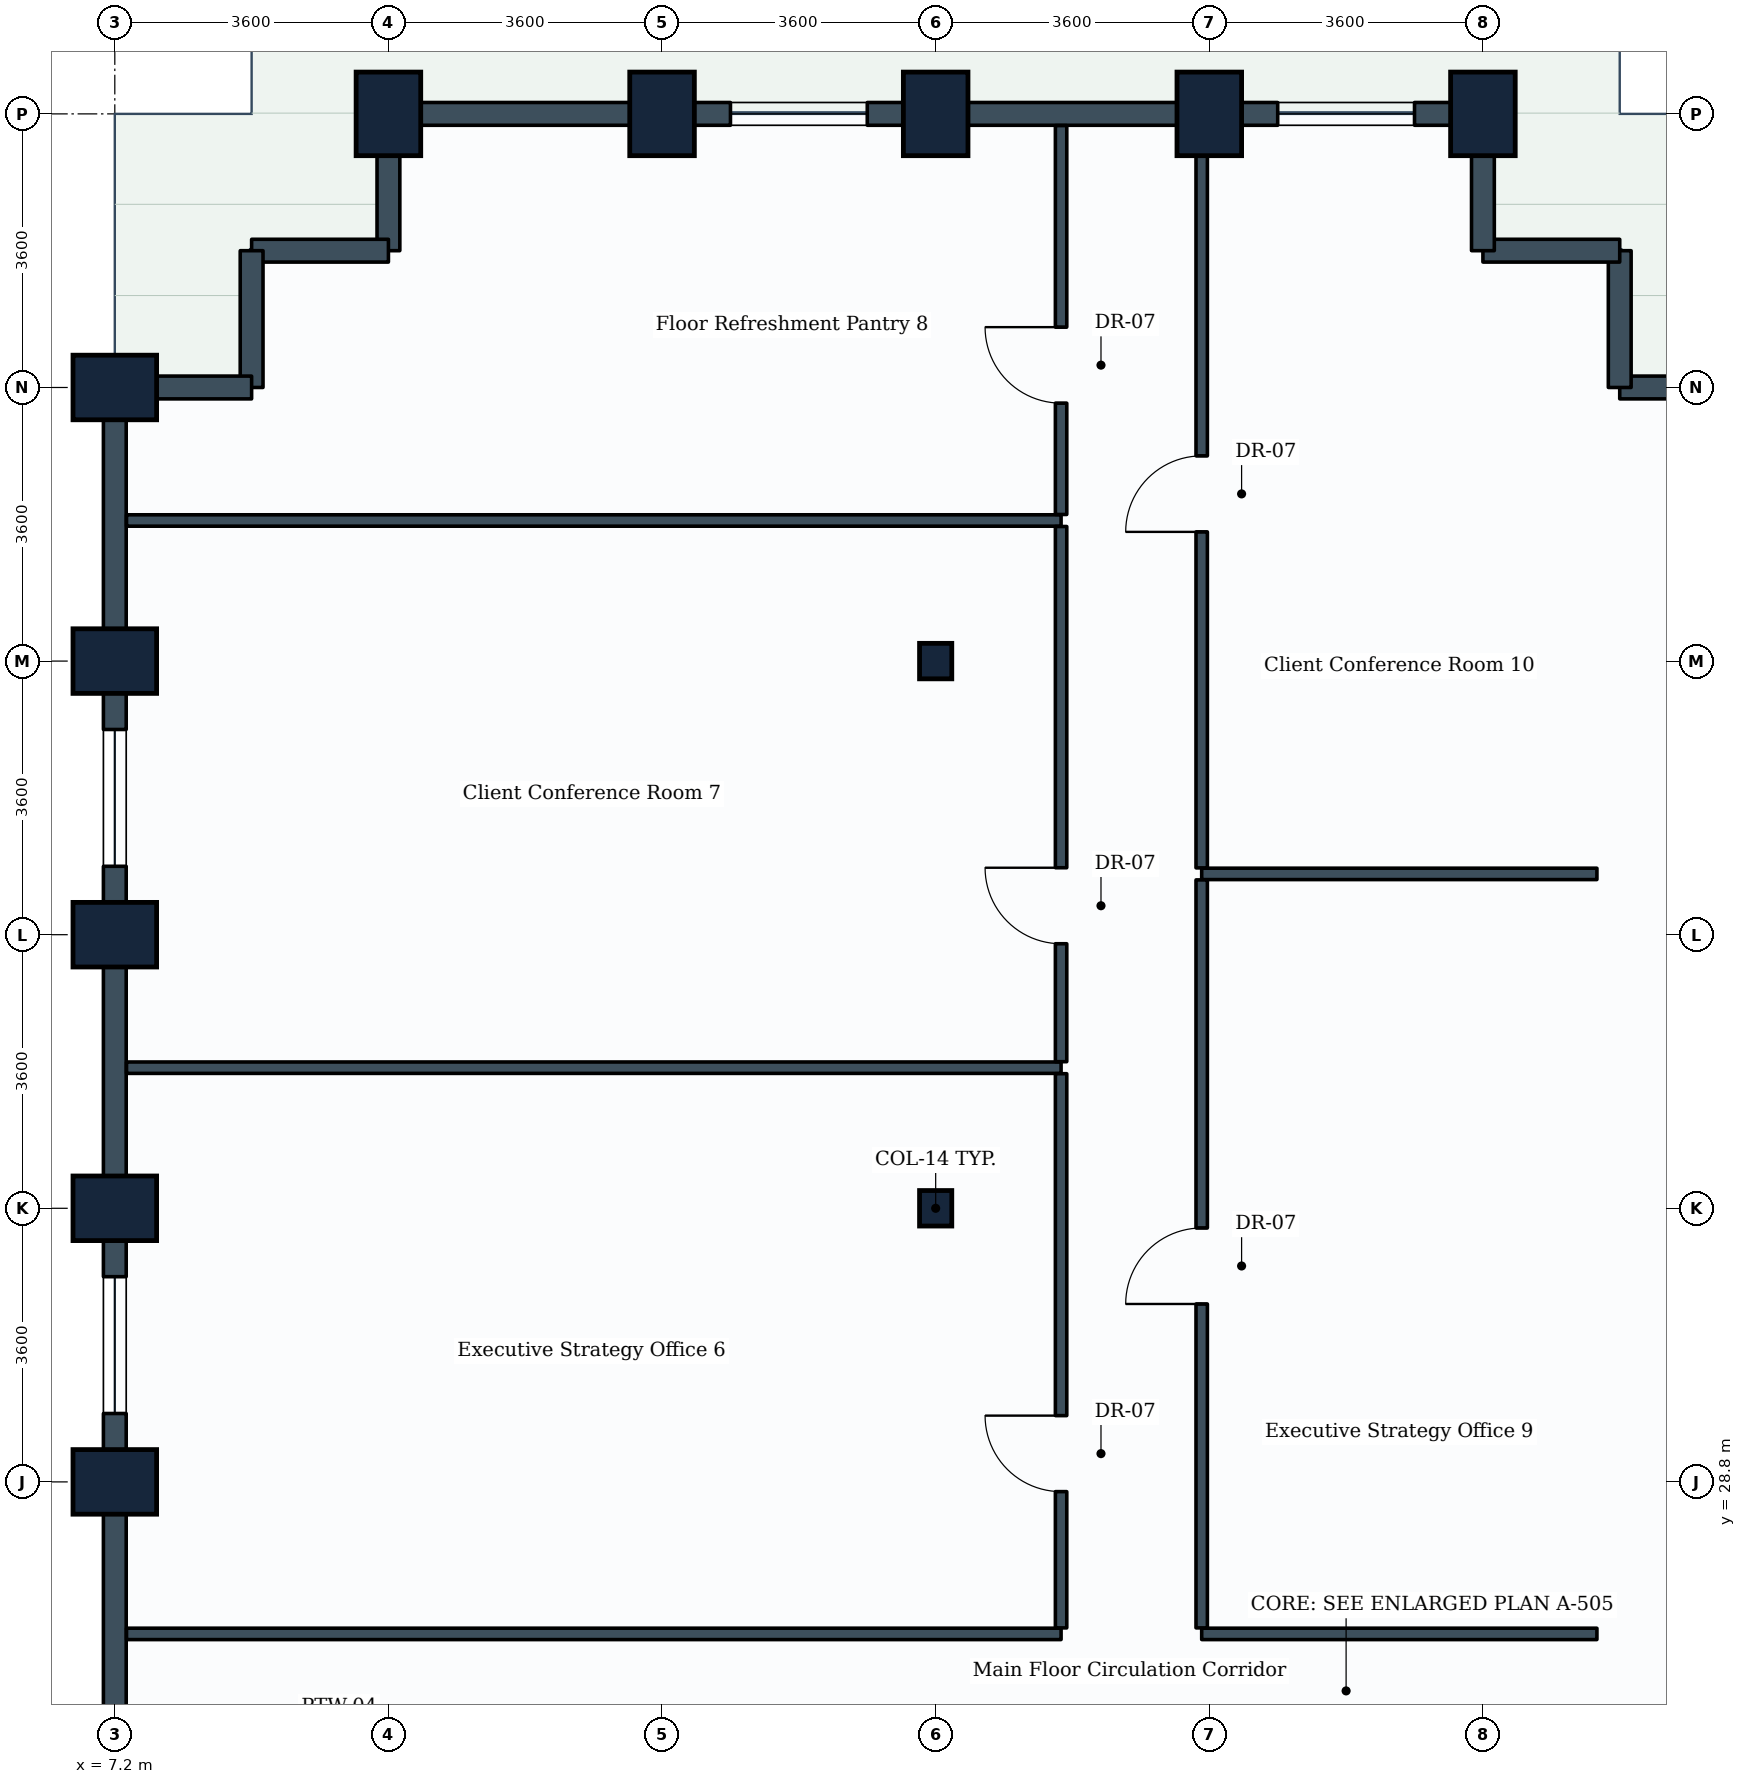
"""IFC4 building model, lengths in metres.
Left out: names, types, materials, properties, quantities, classifications, styles, units other than length and angle.
Written with IfcOpenShell. Run it as: python <this file> out.ifc"""

import sys

from ifc_helpers import new_model, si_unit, direction, frame, frame_2d, origin, origin_2d, place, context, subcontext, project, spatial, rectangle, i_section, extrude, element, fill, save


model = new_model("IFC4")
c1 = context("Model", 3, precision=1e-05, world=origin(), true_north=direction((0.0, 1.0)))
c2 = subcontext(c1, "Body", "Model", "MODEL_VIEW")
j1 = project(units=[si_unit("LENGTHUNIT", "METRE"), si_unit("PLANEANGLEUNIT", "RADIAN")], contexts=[c1])
p1 = place(None, origin())
s1 = spatial("IfcSite", under=j1, at=p1, CompositionType="ELEMENT")
p2 = place(p1, origin())
s2 = spatial("IfcBuilding", under=s1, at=p2, CompositionType="ELEMENT")
p3 = place(p2, frame((0.0, 0.0, 80.1)))
s3 = spatial("IfcBuildingStorey", under=s2, at=p3, CompositionType="ELEMENT", Elevation=80.1)
for number, where, z_axis, x_axis in (
    (1, (7.2, 28.8, 0.0), (0.0, 0.0, 1.0), (0.0, 1.0, 0.0)),
    (2, (7.2, 32.4, 0.0), (0.0, 0.0, 1.0), (0.0, 1.0, 0.0)),
    (3, (7.2, 36.0, 0.0), (0.0, 0.0, 1.0), (0.0, 1.0, 0.0)),
    (4, (7.2, 39.6, 0.0), (0.0, 0.0, 1.0), (0.0, 1.0, 0.0)),
    (5, (7.2, 43.2, 0.0), (0.0, 0.0, 1.0), (0.0, 1.0, 0.0)),
    (6, (10.8, 46.8, 0.0), (0.0, 0.0, 1.0), (1.0, 0.0, 0.0)),
    (7, (14.4, 46.8, 0.0), (0.0, 0.0, 1.0), (1.0, 0.0, 0.0)),
):
    element("IfcColumn", number, at=place(p3, frame(where, z_axis=z_axis, x_axis=x_axis)), inside=s3, PredefinedType="COLUMN", context=c2, shape_type="SweptSolid", body=[
        extrude(rectangle(XDim=0.85, YDim=1.1, at=origin_2d()), origin(), (0.0, 0.0, 1.0), 3.9),
    ])
for number, where, z_axis, x_axis in (
    (8, (18.0, 32.4, 0.0), (0.0, 0.0, 1.0), (1.0, 0.0, 0.0)),
    (9, (18.0, 39.6, 0.0), (0.0, 0.0, 1.0), (1.0, 0.0, 0.0)),
):
    element("IfcColumn", number, at=place(p3, frame(where, z_axis=z_axis, x_axis=x_axis)), inside=s3, PredefinedType="COLUMN", context=c2, shape_type="SweptSolid", body=[
        extrude(i_section(OverallWidth=0.424, OverallDepth=0.467, WebThickness=0.033, FlangeThickness=0.053, FilletRadius=0.015, at=origin_2d()), origin(), (0.0, 0.0, 1.0), 3.9),
    ])
for number, where, z_axis, x_axis in (
    (10, (18.0, 46.8, 0.0), (0.0, 0.0, 1.0), (1.0, 0.0, 0.0)),
    (11, (21.6, 46.8, 0.0), (0.0, 0.0, 1.0), (1.0, 0.0, 0.0)),
    (12, (25.2, 46.8, 0.0), (0.0, 0.0, 1.0), (1.0, 0.0, 0.0)),
):
    element("IfcColumn", number, at=place(p3, frame(where, z_axis=z_axis, x_axis=x_axis)), inside=s3, PredefinedType="COLUMN", context=c2, shape_type="SweptSolid", body=[
        extrude(rectangle(XDim=0.85, YDim=1.1, at=origin_2d()), origin(), (0.0, 0.0, 1.0), 3.9),
    ])
p4 = place(p3, frame((27.0, 43.2, 0.0), z_axis=(0.0, 0.0, 1.0), x_axis=(1.0, 0.0, 0.0)))
e13 = element("IfcWall", 13, at=p4, inside=s3, PredefinedType="STANDARD", context=c2, shape_type="SweptSolid", body=[
    extrude(rectangle(XDim=1.8, YDim=0.3, at=frame_2d((0.9, 0.0))), origin(), (0.0, 0.0, 1.0), 2.93),
])
for number, where, z_axis, x_axis in (
    (14, (27.0, 43.2, 0.0), (0.0, 0.0, 1.0), (0.0, 1.0, 0.0)),
    (15, (25.2, 45.0, 0.0), (0.0, 0.0, 1.0), (1.0, 0.0, 0.0)),
):
    element("IfcWall", number, at=place(p3, frame(where, z_axis=z_axis, x_axis=x_axis)), inside=s3, PredefinedType="STANDARD", context=c2, shape_type="SweptSolid", body=[
        extrude(rectangle(XDim=1.8, YDim=0.3, at=frame_2d((0.9, 0.0))), origin(), (0.0, 0.0, 1.0), 3.635),
    ])
p5 = place(p3, frame((25.2, 45.0, 0.0), z_axis=(0.0, 0.0, 1.0), x_axis=(0.0, 1.0, 0.0)))
e16 = element("IfcWall", 16, at=p5, inside=s3, PredefinedType="STANDARD", context=c2, shape_type="SweptSolid", body=[
    extrude(rectangle(XDim=1.8, YDim=0.3, at=frame_2d((0.9, 0.0))), origin(), (0.0, 0.0, 1.0), 2.93),
])
p6 = place(p3, frame((21.6, 46.8, 0.0), z_axis=(0.0, 0.0, 1.0), x_axis=(1.0, 0.0, 0.0)))
e17 = element("IfcWall", 17, at=p6, inside=s3, PredefinedType="STANDARD", context=c2, shape_type="SweptSolid", body=[
    extrude(rectangle(XDim=3.6, YDim=0.3, at=frame_2d((1.8, 0.0))), origin(), (0.0, 0.0, 1.0), 2.93),
])
p7 = place(p6, frame((0.9, 0.0, 0.85)))
e18 = element("IfcOpeningElement", 18, at=p7, cuts=e17, PredefinedType="OPENING", context=c2, shape_type="SweptSolid", body=[
    extrude(rectangle(XDim=1.8, YDim=1.35, at=frame_2d((0.9, 0.675))), frame((0.0, 0.16, 0.0), z_axis=(0.0, -1.0, 0.0), x_axis=(1.0, 0.0, 0.0)), (0.0, 0.0, 1.0), 0.32),
])
p8 = place(p3, frame((18.0, 46.8, 0.0), z_axis=(0.0, 0.0, 1.0), x_axis=(1.0, 0.0, 0.0)))
e19 = element("IfcWall", 19, at=p8, inside=s3, PredefinedType="STANDARD", context=c2, shape_type="SweptSolid", body=[
    extrude(rectangle(XDim=3.6, YDim=0.3, at=frame_2d((1.8, 0.0))), origin(), (0.0, 0.0, 1.0), 2.93),
])
p9 = place(p3, frame((14.4, 46.8, 0.0), z_axis=(0.0, 0.0, 1.0), x_axis=(1.0, 0.0, 0.0)))
e20 = element("IfcWall", 20, at=p9, inside=s3, PredefinedType="STANDARD", context=c2, shape_type="SweptSolid", body=[
    extrude(rectangle(XDim=3.6, YDim=0.3, at=frame_2d((1.8, 0.0))), origin(), (0.0, 0.0, 1.0), 2.93),
])
p10 = place(p9, frame((0.9, 0.0, 0.85)))
e21 = element("IfcOpeningElement", 21, at=p10, cuts=e20, PredefinedType="OPENING", context=c2, shape_type="SweptSolid", body=[
    extrude(rectangle(XDim=1.8, YDim=1.35, at=frame_2d((0.9, 0.675))), frame((0.0, 0.16, 0.0), z_axis=(0.0, -1.0, 0.0), x_axis=(1.0, 0.0, 0.0)), (0.0, 0.0, 1.0), 0.32),
])
p11 = place(p3, frame((10.8, 46.8, 0.0), z_axis=(0.0, 0.0, 1.0), x_axis=(1.0, 0.0, 0.0)))
e22 = element("IfcWall", 22, at=p11, inside=s3, PredefinedType="STANDARD", context=c2, shape_type="SweptSolid", body=[
    extrude(rectangle(XDim=3.6, YDim=0.3, at=frame_2d((1.8, 0.0))), origin(), (0.0, 0.0, 1.0), 2.93),
])
p12 = place(p3, frame((10.8, 45.0, 0.0), z_axis=(0.0, 0.0, 1.0), x_axis=(0.0, 1.0, 0.0)))
e23 = element("IfcWall", 23, at=p12, inside=s3, PredefinedType="STANDARD", context=c2, shape_type="SweptSolid", body=[
    extrude(rectangle(XDim=1.8, YDim=0.3, at=frame_2d((0.9, 0.0))), origin(), (0.0, 0.0, 1.0), 2.93),
])
for number, where, z_axis, x_axis in (
    (24, (9.0, 45.0, 0.0), (0.0, 0.0, 1.0), (1.0, 0.0, 0.0)),
    (25, (9.0, 43.2, 0.0), (0.0, 0.0, 1.0), (0.0, 1.0, 0.0)),
):
    element("IfcWall", number, at=place(p3, frame(where, z_axis=z_axis, x_axis=x_axis)), inside=s3, PredefinedType="STANDARD", context=c2, shape_type="SweptSolid", body=[
        extrude(rectangle(XDim=1.8, YDim=0.3, at=frame_2d((0.9, 0.0))), origin(), (0.0, 0.0, 1.0), 3.635),
    ])
p13 = place(p3, frame((7.2, 43.2, 0.0), z_axis=(0.0, 0.0, 1.0), x_axis=(1.0, 0.0, 0.0)))
e26 = element("IfcWall", 26, at=p13, inside=s3, PredefinedType="STANDARD", context=c2, shape_type="SweptSolid", body=[
    extrude(rectangle(XDim=1.8, YDim=0.3, at=frame_2d((0.9, 0.0))), origin(), (0.0, 0.0, 1.0), 2.93),
])
p14 = place(p3, frame((7.2, 39.6, 0.0), z_axis=(0.0, 0.0, 1.0), x_axis=(0.0, 1.0, 0.0)))
e27 = element("IfcWall", 27, at=p14, inside=s3, PredefinedType="STANDARD", context=c2, shape_type="SweptSolid", body=[
    extrude(rectangle(XDim=3.6, YDim=0.3, at=frame_2d((1.8, 0.0))), origin(), (0.0, 0.0, 1.0), 2.93),
])
p15 = place(p3, frame((7.2, 36.0, 0.0), z_axis=(0.0, 0.0, 1.0), x_axis=(0.0, 1.0, 0.0)))
e28 = element("IfcWall", 28, at=p15, inside=s3, PredefinedType="STANDARD", context=c2, shape_type="SweptSolid", body=[
    extrude(rectangle(XDim=3.6, YDim=0.3, at=frame_2d((1.8, 0.0))), origin(), (0.0, 0.0, 1.0), 2.93),
])
p16 = place(p15, frame((0.9, 0.0, 0.85)))
e29 = element("IfcOpeningElement", 29, at=p16, cuts=e28, PredefinedType="OPENING", context=c2, shape_type="SweptSolid", body=[
    extrude(rectangle(XDim=1.8, YDim=1.35, at=frame_2d((0.9, 0.675))), frame((0.0, 0.16, 0.0), z_axis=(0.0, -1.0, 0.0), x_axis=(1.0, 0.0, 0.0)), (0.0, 0.0, 1.0), 0.32),
])
p17 = place(p3, frame((7.2, 32.4, 0.0), z_axis=(0.0, 0.0, 1.0), x_axis=(0.0, 1.0, 0.0)))
e30 = element("IfcWall", 30, at=p17, inside=s3, PredefinedType="STANDARD", context=c2, shape_type="SweptSolid", body=[
    extrude(rectangle(XDim=3.6, YDim=0.3, at=frame_2d((1.8, 0.0))), origin(), (0.0, 0.0, 1.0), 2.93),
])
p18 = place(p3, frame((7.2, 28.8, 0.0), z_axis=(0.0, 0.0, 1.0), x_axis=(0.0, 1.0, 0.0)))
e31 = element("IfcWall", 31, at=p18, inside=s3, PredefinedType="STANDARD", context=c2, shape_type="SweptSolid", body=[
    extrude(rectangle(XDim=3.6, YDim=0.3, at=frame_2d((1.8, 0.0))), origin(), (0.0, 0.0, 1.0), 2.93),
])
p19 = place(p18, frame((0.9, 0.0, 0.85)))
e32 = element("IfcOpeningElement", 32, at=p19, cuts=e31, PredefinedType="OPENING", context=c2, shape_type="SweptSolid", body=[
    extrude(rectangle(XDim=1.8, YDim=1.35, at=frame_2d((0.9, 0.675))), frame((0.0, 0.16, 0.0), z_axis=(0.0, -1.0, 0.0), x_axis=(1.0, 0.0, 0.0)), (0.0, 0.0, 1.0), 0.32),
])
p20 = place(p3, frame((7.2, 25.2, 0.0), z_axis=(0.0, 0.0, 1.0), x_axis=(0.0, 1.0, 0.0)))
e33 = element("IfcWall", 33, at=p20, inside=s3, PredefinedType="STANDARD", context=c2, shape_type="SweptSolid", body=[
    extrude(rectangle(XDim=3.6, YDim=0.3, at=frame_2d((1.8, 0.0))), origin(), (0.0, 0.0, 1.0), 2.93),
])
for number, where, z_axis, x_axis in (
    (34, (7.354, 26.8, 0.0), (0.0, 0.0, 1.0), (1.0, 0.0, 0.0)),
    (35, (7.354, 34.25, 0.0), (0.0, 0.0, 1.0), (1.0, 0.0, 0.0)),
):
    element("IfcWall", number, at=place(p3, frame(where, z_axis=z_axis, x_axis=x_axis)), inside=s3, PredefinedType="PARTITIONING", context=c2, shape_type="SweptSolid", body=[
        extrude(rectangle(XDim=12.296, YDim=0.15, at=frame_2d((6.148, 0.0))), origin(), (0.0, 0.0, 1.0), 2.93),
    ])
p21 = place(p3, frame((19.65, 26.879, 0.0), z_axis=(0.0, 0.0, 1.0), x_axis=(0.0, 1.0, 0.0)))
e36 = element("IfcWall", 36, at=p21, inside=s3, PredefinedType="PARTITIONING", context=c2, shape_type="SweptSolid", body=[
    extrude(rectangle(XDim=7.292, YDim=0.15, at=frame_2d((3.646, 0.0))), origin(), (0.0, 0.0, 1.0), 3.19),
])
p22 = place(p21, frame((1.793, 0.0, 0.0)))
e37 = element("IfcOpeningElement", 37, at=p22, cuts=e36, PredefinedType="OPENING", context=c2, shape_type="SweptSolid", body=[
    extrude(rectangle(XDim=1.0, YDim=2.1, at=frame_2d((0.5, 1.05))), frame((0.0, 0.085, 0.0), z_axis=(0.0, -1.0, 0.0), x_axis=(1.0, 0.0, 0.0)), (0.0, 0.0, 1.0), 0.17),
])
p23 = place(p3, frame((7.354, 41.45, 0.0), z_axis=(0.0, 0.0, 1.0), x_axis=(1.0, 0.0, 0.0)))
e38 = element("IfcWall", 38, at=p23, inside=s3, PredefinedType="PARTITIONING", context=c2, shape_type="SweptSolid", body=[
    extrude(rectangle(XDim=12.296, YDim=0.15, at=frame_2d((6.148, 0.0))), origin(), (0.0, 0.0, 1.0), 2.93),
])
p24 = place(p3, frame((19.65, 34.329, 0.0), z_axis=(0.0, 0.0, 1.0), x_axis=(0.0, 1.0, 0.0)))
e39 = element("IfcWall", 39, at=p24, inside=s3, PredefinedType="PARTITIONING", context=c2, shape_type="SweptSolid", body=[
    extrude(rectangle(XDim=7.042, YDim=0.15, at=frame_2d((3.521, 0.0))), origin(), (0.0, 0.0, 1.0), 3.19),
])
p25 = place(p24, frame((1.552, 0.0, 0.0)))
e40 = element("IfcOpeningElement", 40, at=p25, cuts=e39, PredefinedType="OPENING", context=c2, shape_type="SweptSolid", body=[
    extrude(rectangle(XDim=1.0, YDim=2.1, at=frame_2d((0.5, 1.05))), frame((0.0, 0.085, 0.0), z_axis=(0.0, -1.0, 0.0), x_axis=(1.0, 0.0, 0.0)), (0.0, 0.0, 1.0), 0.17),
])
p26 = place(p3, frame((19.65, 41.529, 0.0), z_axis=(0.0, 0.0, 1.0), x_axis=(0.0, 1.0, 0.0)))
e41 = element("IfcWall", 41, at=p26, inside=s3, PredefinedType="PARTITIONING", context=c2, shape_type="SweptSolid", body=[
    extrude(rectangle(XDim=5.117, YDim=0.15, at=frame_2d((2.559, 0.0))), origin(), (0.0, 0.0, 1.0), 2.93),
])
p27 = place(p26, frame((1.465, 0.0, 0.0)))
e42 = element("IfcOpeningElement", 42, at=p27, cuts=e41, PredefinedType="OPENING", context=c2, shape_type="SweptSolid", body=[
    extrude(rectangle(XDim=1.0, YDim=2.1, at=frame_2d((0.5, 1.05))), frame((0.0, 0.085, 0.0), z_axis=(0.0, -1.0, 0.0), x_axis=(1.0, 0.0, 0.0)), (0.0, 0.0, 1.0), 0.17),
])
p28 = place(p3, frame((21.5, 26.8, 0.0), z_axis=(0.0, 0.0, 1.0), x_axis=(1.0, 0.0, 0.0)))
e43 = element("IfcWall", 43, at=p28, inside=s3, PredefinedType="PARTITIONING", context=c2, shape_type="SweptSolid", body=[
    extrude(rectangle(XDim=5.2, YDim=0.15, at=frame_2d((2.6, 0.0))), origin(), (0.0, 0.0, 1.0), 3.635),
])
p29 = place(p3, frame((21.5, 36.8, 0.0), z_axis=(0.0, 0.0, 1.0), x_axis=(1.0, 0.0, 0.0)))
e44 = element("IfcWall", 44, at=p29, inside=s3, PredefinedType="PARTITIONING", context=c2, shape_type="SweptSolid", body=[
    extrude(rectangle(XDim=5.2, YDim=0.15, at=frame_2d((2.6, 0.0))), origin(), (0.0, 0.0, 1.0), 3.18),
])
p30 = place(p3, frame((21.5, 26.879, 0.0), z_axis=(0.0, 0.0, 1.0), x_axis=(0.0, 1.0, 0.0)))
e45 = element("IfcWall", 45, at=p30, inside=s3, PredefinedType="PARTITIONING", context=c2, shape_type="SweptSolid", body=[
    extrude(rectangle(XDim=9.842, YDim=0.15, at=frame_2d((4.921, 0.0))), origin(), (0.0, 0.0, 1.0), 3.18),
])
p31 = place(p30, frame((4.262, 0.0, 0.0)))
e46 = element("IfcOpeningElement", 46, at=p31, cuts=e45, PredefinedType="OPENING", context=c2, shape_type="SweptSolid", body=[
    extrude(rectangle(XDim=1.0, YDim=2.1, at=frame_2d((0.5, 1.05))), frame((0.0, 0.085, 0.0), z_axis=(0.0, -1.0, 0.0), x_axis=(1.0, 0.0, 0.0)), (0.0, 0.0, 1.0), 0.17),
])
p32 = place(p3, frame((21.5, 36.879, 0.0), z_axis=(0.0, 0.0, 1.0), x_axis=(0.0, 1.0, 0.0)))
e47 = element("IfcWall", 47, at=p32, inside=s3, PredefinedType="PARTITIONING", context=c2, shape_type="SweptSolid", body=[
    extrude(rectangle(XDim=9.767, YDim=0.15, at=frame_2d((4.884, 0.0))), origin(), (0.0, 0.0, 1.0), 2.93),
])
p33 = place(p32, frame((4.421, 0.0, 0.0)))
e48 = element("IfcOpeningElement", 48, at=p33, cuts=e47, PredefinedType="OPENING", context=c2, shape_type="SweptSolid", body=[
    extrude(rectangle(XDim=1.0, YDim=2.1, at=frame_2d((0.5, 1.05))), frame((0.0, 0.085, 0.0), z_axis=(0.0, -1.0, 0.0), x_axis=(1.0, 0.0, 0.0)), (0.0, 0.0, 1.0), 0.17),
])
p34 = place(p7, origin())
e49 = element("IfcWindow", 49, at=p34, inside=s3, PartitioningType="SINGLE_PANEL", PredefinedType="WINDOW", context=c2, shape_type="SweptSolid", body=[
    extrude(rectangle(XDim=1.8, YDim=1.35, at=frame_2d((0.9, 0.675))), frame((0.0, 0.03, 0.0), z_axis=(0.0, -1.0, 0.0), x_axis=(1.0, 0.0, 0.0)), (0.0, 0.0, 1.0), 0.06),
])
fill(e18, e49)
p35 = place(p10, origin())
e50 = element("IfcWindow", 50, at=p35, inside=s3, PartitioningType="SINGLE_PANEL", PredefinedType="WINDOW", context=c2, shape_type="SweptSolid", body=[
    extrude(rectangle(XDim=1.8, YDim=1.35, at=frame_2d((0.9, 0.675))), frame((0.0, 0.03, 0.0), z_axis=(0.0, -1.0, 0.0), x_axis=(1.0, 0.0, 0.0)), (0.0, 0.0, 1.0), 0.06),
])
fill(e21, e50)
p36 = place(p16, origin())
e51 = element("IfcWindow", 51, at=p36, inside=s3, PartitioningType="SINGLE_PANEL", PredefinedType="WINDOW", context=c2, shape_type="SweptSolid", body=[
    extrude(rectangle(XDim=1.8, YDim=1.35, at=frame_2d((0.9, 0.675))), frame((0.0, 0.03, 0.0), z_axis=(0.0, -1.0, 0.0), x_axis=(1.0, 0.0, 0.0)), (0.0, 0.0, 1.0), 0.06),
])
fill(e29, e51)
p37 = place(p19, origin())
e52 = element("IfcWindow", 52, at=p37, inside=s3, PartitioningType="SINGLE_PANEL", PredefinedType="WINDOW", context=c2, shape_type="SweptSolid", body=[
    extrude(rectangle(XDim=1.8, YDim=1.35, at=frame_2d((0.9, 0.675))), frame((0.0, 0.03, 0.0), z_axis=(0.0, -1.0, 0.0), x_axis=(1.0, 0.0, 0.0)), (0.0, 0.0, 1.0), 0.06),
])
fill(e32, e52)
p38 = place(p22, origin())
e53 = element("IfcDoor", 53, at=p38, inside=s3, OperationType="SINGLE_SWING_RIGHT", PredefinedType="DOOR", context=c2, shape_type="SweptSolid", body=[
    extrude(rectangle(XDim=1.0, YDim=2.1, at=frame_2d((0.5, 1.05))), frame((0.0, 0.025, 0.0), z_axis=(0.0, -1.0, 0.0), x_axis=(1.0, 0.0, 0.0)), (0.0, 0.0, 1.0), 0.05),
])
fill(e37, e53)
p39 = place(p25, origin())
e54 = element("IfcDoor", 54, at=p39, inside=s3, OperationType="SINGLE_SWING_RIGHT", PredefinedType="DOOR", context=c2, shape_type="SweptSolid", body=[
    extrude(rectangle(XDim=1.0, YDim=2.1, at=frame_2d((0.5, 1.05))), frame((0.0, 0.025, 0.0), z_axis=(0.0, -1.0, 0.0), x_axis=(1.0, 0.0, 0.0)), (0.0, 0.0, 1.0), 0.05),
])
fill(e40, e54)
p40 = place(p27, origin())
e55 = element("IfcDoor", 55, at=p40, inside=s3, OperationType="SINGLE_SWING_RIGHT", PredefinedType="DOOR", context=c2, shape_type="SweptSolid", body=[
    extrude(rectangle(XDim=1.0, YDim=2.1, at=frame_2d((0.5, 1.05))), frame((0.0, 0.025, 0.0), z_axis=(0.0, -1.0, 0.0), x_axis=(1.0, 0.0, 0.0)), (0.0, 0.0, 1.0), 0.05),
])
fill(e42, e55)
p41 = place(p31, origin())
e56 = element("IfcDoor", 56, at=p41, inside=s3, OperationType="SINGLE_SWING_LEFT", PredefinedType="DOOR", context=c2, shape_type="SweptSolid", body=[
    extrude(rectangle(XDim=1.0, YDim=2.1, at=frame_2d((0.5, 1.05))), frame((0.0, 0.025, 0.0), z_axis=(0.0, -1.0, 0.0), x_axis=(1.0, 0.0, 0.0)), (0.0, 0.0, 1.0), 0.05),
])
fill(e46, e56)
p42 = place(p33, origin())
e57 = element("IfcDoor", 57, at=p42, inside=s3, OperationType="SINGLE_SWING_LEFT", PredefinedType="DOOR", context=c2, shape_type="SweptSolid", body=[
    extrude(rectangle(XDim=1.0, YDim=2.1, at=frame_2d((0.5, 1.05))), frame((0.0, 0.025, 0.0), z_axis=(0.0, -1.0, 0.0), x_axis=(1.0, 0.0, 0.0)), (0.0, 0.0, 1.0), 0.05),
])
fill(e48, e57)
save(model, sys.argv[1])
